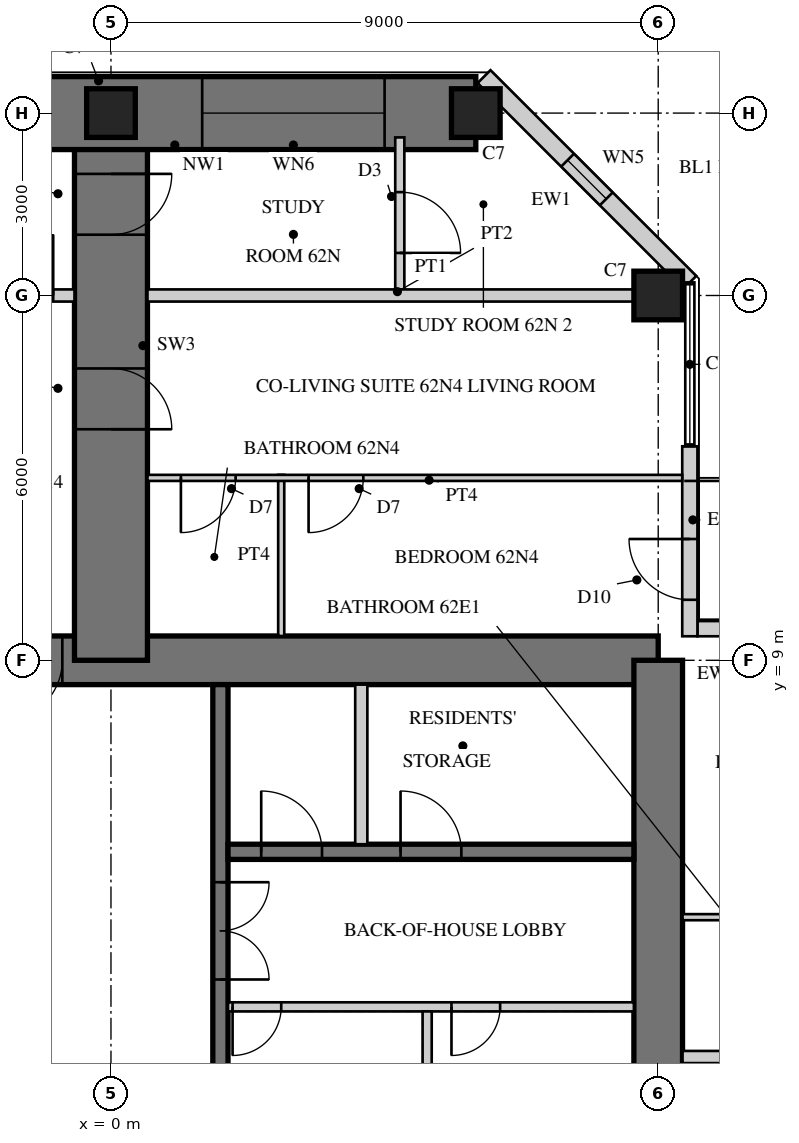
"""IFC4 building model, lengths in metres.
Left out: names, types, materials, properties, quantities, classifications, styles, units other than length and angle.
Written with IfcOpenShell. Run it as: python <this file> out.ifc"""

import sys

from ifc_helpers import new_model, si_unit, direction, frame, frame_2d, origin, origin_2d, place, context, subcontext, project, spatial, rectangle, hollow_rectangle, extrude, element, fill, save


model = new_model("IFC4")
c1 = context("Model", 3, precision=1e-05, world=origin(), true_north=direction((0.0, 1.0)))
c2 = subcontext(c1, "Body", "Model", "MODEL_VIEW")
j1 = project(units=[si_unit("LENGTHUNIT", "METRE"), si_unit("PLANEANGLEUNIT", "RADIAN")], contexts=[c1])
p1 = place(None, origin())
s1 = spatial("IfcSite", under=j1, at=p1, CompositionType="ELEMENT")
p2 = place(p1, origin())
s2 = spatial("IfcBuilding", under=s1, at=p2, CompositionType="ELEMENT")
p3 = place(p2, frame((0.0, 0.0, 242.5)))
s3 = spatial("IfcBuildingStorey", under=s2, at=p3, CompositionType="ELEMENT", Elevation=242.5)
p4 = place(p3, frame((9.0, 9.0, 0.0), z_axis=(0.0, 0.0, 1.0), x_axis=(-1.0, 0.0, 0.0)))
e1 = element("IfcWall", 1, at=p4, inside=s3, PredefinedType="SHEAR", context=c2, shape_type="SweptSolid", body=[
    extrude(rectangle(XDim=18.0, YDim=0.8, at=frame_2d((9.0, 0.0))), origin(), (0.0, 0.0, 1.0), 3.4),
])
p5 = place(p4, frame((9.8, 0.0, 0.0)))
e2 = element("IfcOpeningElement", 2, at=p5, cuts=e1, PredefinedType="OPENING", context=c2, shape_type="SweptSolid", body=[
    extrude(rectangle(XDim=1.0, YDim=2.4, at=frame_2d((0.5, 1.2))), frame((0.0, 0.41, 0.0), z_axis=(0.0, -1.0, 0.0), x_axis=(1.0, 0.0, 0.0)), (0.0, 0.0, 1.0), 0.82),
])
p6 = place(p3, frame((9.0, -9.0, 0.0), z_axis=(0.0, 0.0, 1.0), x_axis=(0.0, 1.0, 0.0)))
e3 = element("IfcWall", 3, at=p6, inside=s3, PredefinedType="SHEAR", context=c2, shape_type="SweptSolid", body=[
    extrude(rectangle(XDim=18.0, YDim=0.8, at=frame_2d((9.0, 0.0))), origin(), (0.0, 0.0, 1.0), 3.4),
])
p7 = place(p6, frame((9.8, 0.0, 0.0)))
e4 = element("IfcOpeningElement", 4, at=p7, cuts=e3, PredefinedType="OPENING", context=c2, shape_type="SweptSolid", body=[
    extrude(rectangle(XDim=1.0, YDim=2.4, at=frame_2d((0.5, 1.2))), frame((0.0, 0.41, 0.0), z_axis=(0.0, -1.0, 0.0), x_axis=(1.0, 0.0, 0.0)), (0.0, 0.0, 1.0), 0.82),
])
p8 = place(p3, frame((1.8, 1.875, 0.0), z_axis=(0.0, 0.0, 1.0), x_axis=(0.0, 1.0, 0.0)))
e5 = element("IfcWall", 5, at=p8, inside=s3, PredefinedType="SHEAR", context=c2, shape_type="SweptSolid", body=[
    extrude(rectangle(XDim=6.725, YDim=0.25, at=frame_2d((3.363, 0.0))), origin(), (0.0, 0.0, 1.0), 3.4),
])
p9 = place(p8, frame((1.875, 0.0, 0.0)))
e6 = element("IfcOpeningElement", 6, at=p9, cuts=e5, PredefinedType="OPENING", context=c2, shape_type="SweptSolid", body=[
    extrude(rectangle(XDim=1.6, YDim=2.4, at=frame_2d((0.8, 1.2))), frame((0.0, 0.135, 0.0), z_axis=(0.0, -1.0, 0.0), x_axis=(1.0, 0.0, 0.0)), (0.0, 0.0, 1.0), 0.27),
])
p10 = place(p3, frame((1.925, 5.85, 0.0), z_axis=(0.0, 0.0, 1.0), x_axis=(1.0, 0.0, 0.0)))
e7 = element("IfcWall", 7, at=p10, inside=s3, PredefinedType="SHEAR", context=c2, shape_type="SweptSolid", body=[
    extrude(rectangle(XDim=6.675, YDim=0.25, at=frame_2d((3.337, 0.0))), origin(), (0.0, 0.0, 1.0), 3.4),
])
p11 = place(p10, frame((0.546, 0.0, 0.0)))
e8 = element("IfcOpeningElement", 8, at=p11, cuts=e7, PredefinedType="OPENING", context=c2, shape_type="SweptSolid", body=[
    extrude(rectangle(XDim=1.0, YDim=2.1, at=frame_2d((0.5, 1.05))), frame((0.0, 0.135, 0.0), z_axis=(0.0, -1.0, 0.0), x_axis=(1.0, 0.0, 0.0)), (0.0, 0.0, 1.0), 0.27),
])
p12 = place(p10, frame((2.837, 0.0, 0.0)))
e9 = element("IfcOpeningElement", 9, at=p12, cuts=e7, PredefinedType="OPENING", context=c2, shape_type="SweptSolid", body=[
    extrude(rectangle(XDim=1.0, YDim=2.1, at=frame_2d((0.5, 1.05))), frame((0.0, 0.135, 0.0), z_axis=(0.0, -1.0, 0.0), x_axis=(1.0, 0.0, 0.0)), (0.0, 0.0, 1.0), 0.27),
])
p13 = place(p3, frame((1.925, 3.3, 0.0), z_axis=(0.0, 0.0, 1.0), x_axis=(1.0, 0.0, 0.0)))
e10 = element("IfcWall", 10, at=p13, inside=s3, PredefinedType="PARTITIONING", context=c2, shape_type="SweptSolid", body=[
    extrude(rectangle(XDim=6.675, YDim=0.15, at=frame_2d((3.337, 0.0))), origin(), (0.0, 0.0, 1.0), 3.4),
])
p14 = place(p13, frame((0.075, 0.0, 0.0)))
e11 = element("IfcOpeningElement", 11, at=p14, cuts=e10, PredefinedType="OPENING", context=c2, shape_type="SweptSolid", body=[
    extrude(rectangle(XDim=0.8, YDim=2.1, at=frame_2d((0.4, 1.05))), frame((0.0, 0.085, 0.0), z_axis=(0.0, -1.0, 0.0), x_axis=(1.0, 0.0, 0.0)), (0.0, 0.0, 1.0), 0.17),
])
p15 = place(p13, frame((3.675, 0.0, 0.0)))
e12 = element("IfcOpeningElement", 12, at=p15, cuts=e10, PredefinedType="OPENING", context=c2, shape_type="SweptSolid", body=[
    extrude(rectangle(XDim=0.8, YDim=2.1, at=frame_2d((0.4, 1.05))), frame((0.0, 0.085, 0.0), z_axis=(0.0, -1.0, 0.0), x_axis=(1.0, 0.0, 0.0)), (0.0, 0.0, 1.0), 0.17),
])
p16 = place(p3, frame((5.2, 2.125, 0.0), z_axis=(0.0, 0.0, 1.0), x_axis=(0.0, 1.0, 0.0)))
e13 = element("IfcWall", 13, at=p16, inside=s3, PredefinedType="PARTITIONING", context=c2, shape_type="SweptSolid", body=[
    extrude(rectangle(XDim=1.1, YDim=0.15, at=frame_2d((0.55, 0.0))), origin(), (0.0, 0.0, 1.0), 3.4),
])
p17 = place(p3, frame((4.117, 5.975, 0.0), z_axis=(0.0, 0.0, 1.0), x_axis=(0.0, 1.0, 0.0)))
e14 = element("IfcWall", 14, at=p17, inside=s3, PredefinedType="PARTITIONING", context=c2, shape_type="SweptSolid", body=[
    extrude(rectangle(XDim=2.625, YDim=0.2, at=frame_2d((1.312, 0.0))), origin(), (0.0, 0.0, 1.0), 3.4),
])
p18 = place(p3, frame((0.0, 9.0, 0.0), z_axis=(0.0, 0.0, 1.0), x_axis=(0.0, 1.0, 0.0)))
e15 = element("IfcWall", 15, at=p18, inside=s3, PredefinedType="SHEAR", context=c2, shape_type="SweptSolid", body=[
    extrude(rectangle(XDim=9.0, YDim=1.2, at=frame_2d((4.5, 0.0))), origin(), (0.0, 0.0, 1.0), 3.4),
])
p19 = place(p18, frame((3.8, 0.0, 0.0)))
e16 = element("IfcOpeningElement", 16, at=p19, cuts=e15, PredefinedType="OPENING", context=c2, shape_type="SweptSolid", body=[
    extrude(rectangle(XDim=1.0, YDim=2.15, at=frame_2d((0.5, 1.075))), frame((0.0, 0.61, 0.0), z_axis=(0.0, -1.0, 0.0), x_axis=(1.0, 0.0, 0.0)), (0.0, 0.0, 1.0), 1.22),
])
p20 = place(p18, frame((7.0, 0.0, 0.0)))
e17 = element("IfcOpeningElement", 17, at=p20, cuts=e15, PredefinedType="OPENING", context=c2, shape_type="SweptSolid", body=[
    extrude(rectangle(XDim=1.0, YDim=2.2, at=frame_2d((0.5, 1.1))), frame((0.0, 0.61, 0.0), z_axis=(0.0, -1.0, 0.0), x_axis=(1.0, 0.0, 0.0)), (0.0, 0.0, 1.0), 1.22),
])
p21 = place(p3, frame((6.0, 18.0, 0.0), z_axis=(0.0, 0.0, 1.0), x_axis=(-1.0, 0.0, 0.0)))
e18 = element("IfcWall", 18, at=p21, inside=s3, PredefinedType="SHEAR", context=c2, shape_type="SweptSolid", body=[
    extrude(rectangle(XDim=12.0, YDim=1.2, at=frame_2d((6.0, 0.0))), origin(), (0.0, 0.0, 1.0), 3.4),
])
p22 = place(p21, frame((1.5, 0.0, 0.6)))
e19 = element("IfcOpeningElement", 19, at=p22, cuts=e18, PredefinedType="OPENING", context=c2, shape_type="SweptSolid", body=[
    extrude(rectangle(XDim=3.0, YDim=2.4, at=frame_2d((1.5, 1.2))), frame((0.0, 0.61, 0.0), z_axis=(0.0, -1.0, 0.0), x_axis=(1.0, 0.0, 0.0)), (0.0, 0.0, 1.0), 1.22),
])
p23 = place(p21, frame((7.5, 0.0, 0.6)))
e20 = element("IfcOpeningElement", 20, at=p23, cuts=e18, PredefinedType="OPENING", context=c2, shape_type="SweptSolid", body=[
    extrude(rectangle(XDim=3.0, YDim=2.4, at=frame_2d((1.5, 1.2))), frame((0.0, 0.61, 0.0), z_axis=(0.0, -1.0, 0.0), x_axis=(1.0, 0.0, 0.0)), (0.0, 0.0, 1.0), 1.22),
])
for number, where, z_axis, x_axis in (
    (21, (9.0, 15.0, 0.0), (0.0, 0.0, 1.0), (1.0, 0.0, 0.0)),
    (22, (6.0, 18.0, 0.0), (0.0, 0.0, 1.0), (1.0, 0.0, 0.0)),
    (23, (0.0, 18.0, 0.0), (0.0, 0.0, 1.0), (1.0, 0.0, 0.0)),
):
    element("IfcColumn", number, at=place(p3, frame(where, z_axis=z_axis, x_axis=x_axis)), inside=s3, PredefinedType="COLUMN", context=c2, shape_type="SweptSolid", body=[
        extrude(rectangle(XDim=0.8, YDim=0.8, at=origin_2d()), origin(), (0.0, 0.0, 1.0), 3.4),
    ])
p24 = place(p3, frame((12.52, 9.52, 0.0), z_axis=(0.0, 0.0, 1.0), x_axis=(-1.0, 0.0, 0.0)))
e24 = element("IfcWall", 24, at=p24, inside=s3, PredefinedType="SOLIDWALL", context=c2, shape_type="SweptSolid", body=[
    extrude(rectangle(XDim=2.875, YDim=0.25, at=frame_2d((1.438, 0.0))), origin(), (0.0, 0.0, 1.0), 3.22),
])
p25 = place(p24, frame((0.6, 0.0, 0.0)))
e25 = element("IfcOpeningElement", 25, at=p25, cuts=e24, PredefinedType="OPENING", context=c2, shape_type="SweptSolid", body=[
    extrude(rectangle(XDim=1.0, YDim=2.2, at=frame_2d((0.5, 1.1))), frame((0.0, 0.135, 0.0), z_axis=(0.0, -1.0, 0.0), x_axis=(1.0, 0.0, 0.0)), (0.0, 0.0, 1.0), 0.27),
])
p26 = place(p3, frame((9.52, 9.395, 0.0), z_axis=(0.0, 0.0, 1.0), x_axis=(0.0, 1.0, 0.0)))
e26 = element("IfcWall", 26, at=p26, inside=s3, PredefinedType="SOLIDWALL", context=c2, shape_type="SweptSolid", body=[
    extrude(rectangle(XDim=3.125, YDim=0.25, at=frame_2d((1.562, 0.0))), origin(), (0.0, 0.0, 1.0), 3.22),
])
p27 = place(p26, frame((0.6, 0.0, 0.0)))
e27 = element("IfcOpeningElement", 27, at=p27, cuts=e26, PredefinedType="OPENING", context=c2, shape_type="SweptSolid", body=[
    extrude(rectangle(XDim=1.0, YDim=2.2, at=frame_2d((0.5, 1.1))), frame((0.0, 0.135, 0.0), z_axis=(0.0, -1.0, 0.0), x_axis=(1.0, 0.0, 0.0)), (0.0, 0.0, 1.0), 0.27),
])
p28 = place(p3, frame((9.52, 15.215, 0.0), z_axis=(0.0, 0.0, 1.0), x_axis=(-0.707081278264, 0.707132283189, 0.0)))
e28 = element("IfcWall", 28, at=p28, inside=s3, PredefinedType="SOLIDWALL", context=c2, shape_type="SweptSolid", body=[
    extrude(rectangle(XDim=4.787, YDim=0.3, at=frame_2d((2.393, 0.0))), origin(), (0.0, 0.0, 1.0), 3.22),
])
p29 = place(p28, frame((1.943, 0.0, 0.3)))
e29 = element("IfcOpeningElement", 29, at=p29, cuts=e28, PredefinedType="OPENING", context=c2, shape_type="SweptSolid", body=[
    extrude(rectangle(XDim=0.9, YDim=2.4, at=frame_2d((0.45, 1.2))), frame((0.0, 0.16, 0.0), z_axis=(0.0, -1.0, 0.0), x_axis=(1.0, 0.0, 0.0)), (0.0, 0.0, 1.0), 0.32),
])
p30 = place(p3, frame((2.8, 9.4, 0.0), z_axis=(0.0, 0.0, 1.0), x_axis=(0.0, 1.0, 0.0)))
e30 = element("IfcWall", 30, at=p30, inside=s3, PredefinedType="PARTITIONING", context=c2, shape_type="SweptSolid", body=[
    extrude(rectangle(XDim=2.65, YDim=0.1, at=frame_2d((1.325, 0.0))), origin(), (0.0, 0.0, 1.0), 3.22),
])
p31 = place(p3, frame((9.395, 12.0, 0.0), z_axis=(0.0, 0.0, 1.0), x_axis=(-1.0, 0.0, 0.0)))
e31 = element("IfcWall", 31, at=p31, inside=s3, PredefinedType="PARTITIONING", context=c2, shape_type="SweptSolid", body=[
    extrude(rectangle(XDim=8.795, YDim=0.1, at=frame_2d((4.397, 0.0))), origin(), (0.0, 0.0, 1.0), 3.22),
])
p32 = place(p31, frame((5.245, 0.0, 0.0)))
e32 = element("IfcOpeningElement", 32, at=p32, cuts=e31, PredefinedType="OPENING", context=c2, shape_type="SweptSolid", body=[
    extrude(rectangle(XDim=0.9, YDim=2.1, at=frame_2d((0.45, 1.05))), frame((0.0, 0.06, 0.0), z_axis=(0.0, -1.0, 0.0), x_axis=(1.0, 0.0, 0.0)), (0.0, 0.0, 1.0), 0.12),
])
p33 = place(p31, frame((7.345, 0.0, 0.0)))
e33 = element("IfcOpeningElement", 33, at=p33, cuts=e31, PredefinedType="OPENING", context=c2, shape_type="SweptSolid", body=[
    extrude(rectangle(XDim=0.9, YDim=2.1, at=frame_2d((0.45, 1.05))), frame((0.0, 0.06, 0.0), z_axis=(0.0, -1.0, 0.0), x_axis=(1.0, 0.0, 0.0)), (0.0, 0.0, 1.0), 0.12),
])
p34 = place(p3, frame((4.75, 15.1, 0.0), z_axis=(0.0, 0.0, 1.0), x_axis=(0.0, 1.0, 0.0)))
e34 = element("IfcWall", 34, at=p34, inside=s3, PredefinedType="PARTITIONING", context=c2, shape_type="SweptSolid", body=[
    extrude(rectangle(XDim=2.5, YDim=0.15, at=frame_2d((1.25, 0.0))), origin(), (0.0, 0.0, 1.0), 3.22),
])
p35 = place(p34, frame((0.6, 0.0, 0.0)))
e35 = element("IfcOpeningElement", 35, at=p35, cuts=e34, PredefinedType="OPENING", context=c2, shape_type="SweptSolid", body=[
    extrude(rectangle(XDim=1.0, YDim=2.1, at=frame_2d((0.5, 1.05))), frame((0.0, 0.085, 0.0), z_axis=(0.0, -1.0, 0.0), x_axis=(1.0, 0.0, 0.0)), (0.0, 0.0, 1.0), 0.17),
])
p36 = place(p3, frame((8.6, 15.0, 0.0), z_axis=(0.0, 0.0, 1.0), x_axis=(-1.0, 0.0, 0.0)))
e36 = element("IfcWall", 36, at=p36, inside=s3, PredefinedType="SOLIDWALL", context=c2, shape_type="SweptSolid", body=[
    extrude(rectangle(XDim=8.0, YDim=0.2, at=frame_2d((4.0, 0.0))), origin(), (0.0, 0.0, 1.0), 2.52),
])
p37 = place(p3, frame((-0.6, 15.0, 0.0), z_axis=(0.0, 0.0, 1.0), x_axis=(-1.0, 0.0, 0.0)))
e37 = element("IfcWall", 37, at=p37, inside=s3, PredefinedType="SOLIDWALL", context=c2, shape_type="SweptSolid", body=[
    extrude(rectangle(XDim=8.0, YDim=0.2, at=frame_2d((4.0, 0.0))), origin(), (0.0, 0.0, 1.0), 2.52),
])
p38 = place(p37, frame((0.35, 0.0, 0.0)))
e38 = element("IfcOpeningElement", 38, at=p38, cuts=e37, PredefinedType="OPENING", context=c2, shape_type="SweptSolid", body=[
    extrude(rectangle(XDim=1.0, YDim=2.2, at=frame_2d((0.5, 1.1))), frame((0.0, 0.11, 0.0), z_axis=(0.0, -1.0, 0.0), x_axis=(1.0, 0.0, 0.0)), (0.0, 0.0, 1.0), 0.22),
])
p39 = place(p3, frame((9.4, 4.775, 0.0), z_axis=(0.0, 0.0, 1.0), x_axis=(1.0, 0.0, 0.0)))
e39 = element("IfcWall", 39, at=p39, inside=s3, PredefinedType="PARTITIONING", context=c2, shape_type="SweptSolid", body=[
    extrude(rectangle(XDim=3.25, YDim=0.1, at=frame_2d((1.625, 0.0))), origin(), (0.0, 0.0, 1.0), 3.22),
])
p40 = place(p3, frame((9.4, 2.475, 0.0), z_axis=(0.0, 0.0, 1.0), x_axis=(1.0, 0.0, 0.0)))
e40 = element("IfcWall", 40, at=p40, inside=s3, PredefinedType="SOLIDWALL", context=c2, shape_type="SweptSolid", body=[
    extrude(rectangle(XDim=5.6, YDim=0.2, at=frame_2d((2.8, 0.0))), origin(), (0.0, 0.0, 1.0), 3.22),
])
p41 = place(p40, frame((3.75, 0.0, 0.0)))
e41 = element("IfcOpeningElement", 41, at=p41, cuts=e40, PredefinedType="OPENING", context=c2, shape_type="SweptSolid", body=[
    extrude(rectangle(XDim=1.0, YDim=2.15, at=frame_2d((0.5, 1.075))), frame((0.0, 0.11, 0.0), z_axis=(0.0, -1.0, 0.0), x_axis=(1.0, 0.0, 0.0)), (0.0, 0.0, 1.0), 0.22),
])
p42 = place(p27, origin())
e42 = element("IfcDoor", 42, at=p42, inside=s3, OperationType="SINGLE_SWING_RIGHT", PredefinedType="DOOR", context=c2, shape_type="SweptSolid", body=[
    extrude(hollow_rectangle(XDim=1.0, YDim=2.2, WallThickness=0.06, at=frame_2d((0.5, 1.1))), frame((0.0, 0.025, 0.0), z_axis=(0.0, -1.0, 0.0), x_axis=(1.0, 0.0, 0.0)), (0.0, 0.0, 1.0), 0.05),
    extrude(rectangle(XDim=0.879, YDim=2.079, at=frame_2d((0.5, 1.1))), frame((0.0, 0.025, 0.0), z_axis=(0.0, -1.0, 0.0), x_axis=(1.0, 0.0, 0.0)), (0.0, 0.0, 1.0), 0.05),
])
fill(e27, e42)
p43 = place(p29, origin())
e43 = element("IfcWindow", 43, at=p43, inside=s3, PartitioningType="SINGLE_PANEL", PredefinedType="WINDOW", context=c2, shape_type="SweptSolid", body=[
    extrude(hollow_rectangle(XDim=0.9, YDim=2.4, WallThickness=0.06, at=frame_2d((0.45, 1.2))), frame((0.0, 0.03, 0.0), z_axis=(0.0, -1.0, 0.0), x_axis=(1.0, 0.0, 0.0)), (0.0, 0.0, 1.0), 0.06),
    extrude(rectangle(XDim=0.779, YDim=2.279, at=frame_2d((0.45, 1.2))), frame((0.0, 0.03, 0.0), z_axis=(0.0, -1.0, 0.0), x_axis=(1.0, 0.0, 0.0)), (0.0, 0.0, 1.0), 0.06),
])
fill(e29, e43)
p44 = place(p22, origin())
e44 = element("IfcWindow", 44, at=p44, inside=s3, PartitioningType="SINGLE_PANEL", PredefinedType="WINDOW", context=c2, shape_type="SweptSolid", body=[
    extrude(hollow_rectangle(XDim=3.0, YDim=2.4, WallThickness=0.06, at=frame_2d((1.5, 1.2))), frame((0.0, 0.03, 0.0), z_axis=(0.0, -1.0, 0.0), x_axis=(1.0, 0.0, 0.0)), (0.0, 0.0, 1.0), 0.06),
    extrude(rectangle(XDim=2.879, YDim=2.279, at=frame_2d((1.5, 1.2))), frame((0.0, 0.03, 0.0), z_axis=(0.0, -1.0, 0.0), x_axis=(1.0, 0.0, 0.0)), (0.0, 0.0, 1.0), 0.06),
])
fill(e19, e44)
p45 = place(p32, origin())
e45 = element("IfcDoor", 45, at=p45, inside=s3, OperationType="SINGLE_SWING_RIGHT", PredefinedType="DOOR", context=c2, shape_type="SweptSolid", body=[
    extrude(rectangle(XDim=0.9, YDim=2.1, at=frame_2d((0.45, 1.05))), frame((0.0, 0.025, 0.0), z_axis=(0.0, -1.0, 0.0), x_axis=(1.0, 0.0, 0.0)), (0.0, 0.0, 1.0), 0.05),
])
fill(e32, e45)
p46 = place(p33, origin())
e46 = element("IfcDoor", 46, at=p46, inside=s3, OperationType="SINGLE_SWING_RIGHT", PredefinedType="DOOR", context=c2, shape_type="SweptSolid", body=[
    extrude(rectangle(XDim=0.9, YDim=2.1, at=frame_2d((0.45, 1.05))), frame((0.0, 0.025, 0.0), z_axis=(0.0, -1.0, 0.0), x_axis=(1.0, 0.0, 0.0)), (0.0, 0.0, 1.0), 0.05),
])
fill(e33, e46)
p47 = place(p35, frame((1.0, 0.0, 0.0), z_axis=(0.0, 0.0, 1.0), x_axis=(-1.0, 0.0, 0.0)))
e47 = element("IfcDoor", 47, at=p47, inside=s3, OperationType="SINGLE_SWING_RIGHT", PredefinedType="DOOR", context=c2, shape_type="SweptSolid", body=[
    extrude(rectangle(XDim=1.0, YDim=2.1, at=frame_2d((0.5, 1.05))), frame((0.0, 0.025, 0.0), z_axis=(0.0, -1.0, 0.0), x_axis=(1.0, 0.0, 0.0)), (0.0, 0.0, 1.0), 0.05),
])
fill(e35, e47)
p48 = place(p38, frame((1.0, 0.0, 0.0), z_axis=(0.0, 0.0, 1.0), x_axis=(-1.0, 0.0, 0.0)))
e48 = element("IfcDoor", 48, at=p48, inside=s3, OperationType="SINGLE_SWING_RIGHT", PredefinedType="DOOR", context=c2, shape_type="SweptSolid", body=[
    extrude(rectangle(XDim=1.0, YDim=2.2, at=frame_2d((0.5, 1.1))), frame((0.0, 0.025, 0.0), z_axis=(0.0, -1.0, 0.0), x_axis=(1.0, 0.0, 0.0)), (0.0, 0.0, 1.0), 0.05),
])
fill(e38, e48)
p49 = place(p19, frame((1.0, 0.0, 0.0), z_axis=(0.0, 0.0, 1.0), x_axis=(-1.0, 0.0, 0.0)))
e49 = element("IfcDoor", 49, at=p49, inside=s3, OperationType="SINGLE_SWING_RIGHT", PredefinedType="DOOR", context=c2, shape_type="SweptSolid", body=[
    extrude(rectangle(XDim=1.0, YDim=2.15, at=frame_2d((0.5, 1.075))), frame((0.0, 0.025, 0.0), z_axis=(0.0, -1.0, 0.0), x_axis=(1.0, 0.0, 0.0)), (0.0, 0.0, 1.0), 0.05),
])
fill(e16, e49)
p50 = place(p20, frame((1.0, 0.0, 0.0), z_axis=(0.0, 0.0, 1.0), x_axis=(-1.0, 0.0, 0.0)))
e50 = element("IfcDoor", 50, at=p50, inside=s3, OperationType="SINGLE_SWING_LEFT", PredefinedType="DOOR", context=c2, shape_type="SweptSolid", body=[
    extrude(rectangle(XDim=1.0, YDim=2.2, at=frame_2d((0.5, 1.1))), frame((0.0, 0.025, 0.0), z_axis=(0.0, -1.0, 0.0), x_axis=(1.0, 0.0, 0.0)), (0.0, 0.0, 1.0), 0.05),
])
fill(e17, e50)
p51 = place(p5, origin())
e51 = element("IfcDoor", 51, at=p51, inside=s3, OperationType="SINGLE_SWING_RIGHT", PredefinedType="DOOR", context=c2, shape_type="SweptSolid", body=[
    extrude(rectangle(XDim=1.0, YDim=2.4, at=frame_2d((0.5, 1.2))), frame((0.0, 0.055, 0.0), z_axis=(0.0, -1.0, 0.0), x_axis=(1.0, 0.0, 0.0)), (0.0, 0.0, 1.0), 0.05),
])
fill(e2, e51)
p52 = place(p9, frame((1.6, 0.0, 0.0), z_axis=(0.0, 0.0, 1.0), x_axis=(-1.0, 0.0, 0.0)))
e52 = element("IfcDoor", 52, at=p52, inside=s3, OperationType="DOUBLE_DOOR_SINGLE_SWING", PredefinedType="DOOR", context=c2, shape_type="SweptSolid", body=[
    extrude(rectangle(XDim=1.6, YDim=2.4, at=frame_2d((0.8, 1.2))), frame((0.0, 0.025, 0.0), z_axis=(0.0, -1.0, 0.0), x_axis=(1.0, 0.0, 0.0)), (0.0, 0.0, 1.0), 0.05),
])
fill(e6, e52)
p53 = place(p14, frame((0.8, 0.0, 0.0), z_axis=(0.0, 0.0, 1.0), x_axis=(-1.0, 0.0, 0.0)))
e53 = element("IfcDoor", 53, at=p53, inside=s3, OperationType="SINGLE_SWING_RIGHT", PredefinedType="DOOR", context=c2, shape_type="SweptSolid", body=[
    extrude(rectangle(XDim=0.8, YDim=2.1, at=frame_2d((0.4, 1.05))), frame((0.0, 0.025, 0.0), z_axis=(0.0, -1.0, 0.0), x_axis=(1.0, 0.0, 0.0)), (0.0, 0.0, 1.0), 0.05),
])
fill(e11, e53)
p54 = place(p15, frame((0.8, 0.0, 0.0), z_axis=(0.0, 0.0, 1.0), x_axis=(-1.0, 0.0, 0.0)))
e54 = element("IfcDoor", 54, at=p54, inside=s3, OperationType="SINGLE_SWING_RIGHT", PredefinedType="DOOR", context=c2, shape_type="SweptSolid", body=[
    extrude(rectangle(XDim=0.8, YDim=2.1, at=frame_2d((0.4, 1.05))), frame((0.0, 0.025, 0.0), z_axis=(0.0, -1.0, 0.0), x_axis=(1.0, 0.0, 0.0)), (0.0, 0.0, 1.0), 0.05),
])
fill(e12, e54)
p55 = place(p11, origin())
e55 = element("IfcDoor", 55, at=p55, inside=s3, OperationType="SINGLE_SWING_LEFT", PredefinedType="DOOR", context=c2, shape_type="SweptSolid", body=[
    extrude(rectangle(XDim=1.0, YDim=2.1, at=frame_2d((0.5, 1.05))), frame((0.0, 0.025, 0.0), z_axis=(0.0, -1.0, 0.0), x_axis=(1.0, 0.0, 0.0)), (0.0, 0.0, 1.0), 0.05),
])
fill(e8, e55)
p56 = place(p12, origin())
e56 = element("IfcDoor", 56, at=p56, inside=s3, OperationType="SINGLE_SWING_LEFT", PredefinedType="DOOR", context=c2, shape_type="SweptSolid", body=[
    extrude(rectangle(XDim=1.0, YDim=2.1, at=frame_2d((0.5, 1.05))), frame((0.0, 0.025, 0.0), z_axis=(0.0, -1.0, 0.0), x_axis=(1.0, 0.0, 0.0)), (0.0, 0.0, 1.0), 0.05),
])
fill(e9, e56)
save(model, sys.argv[1])
